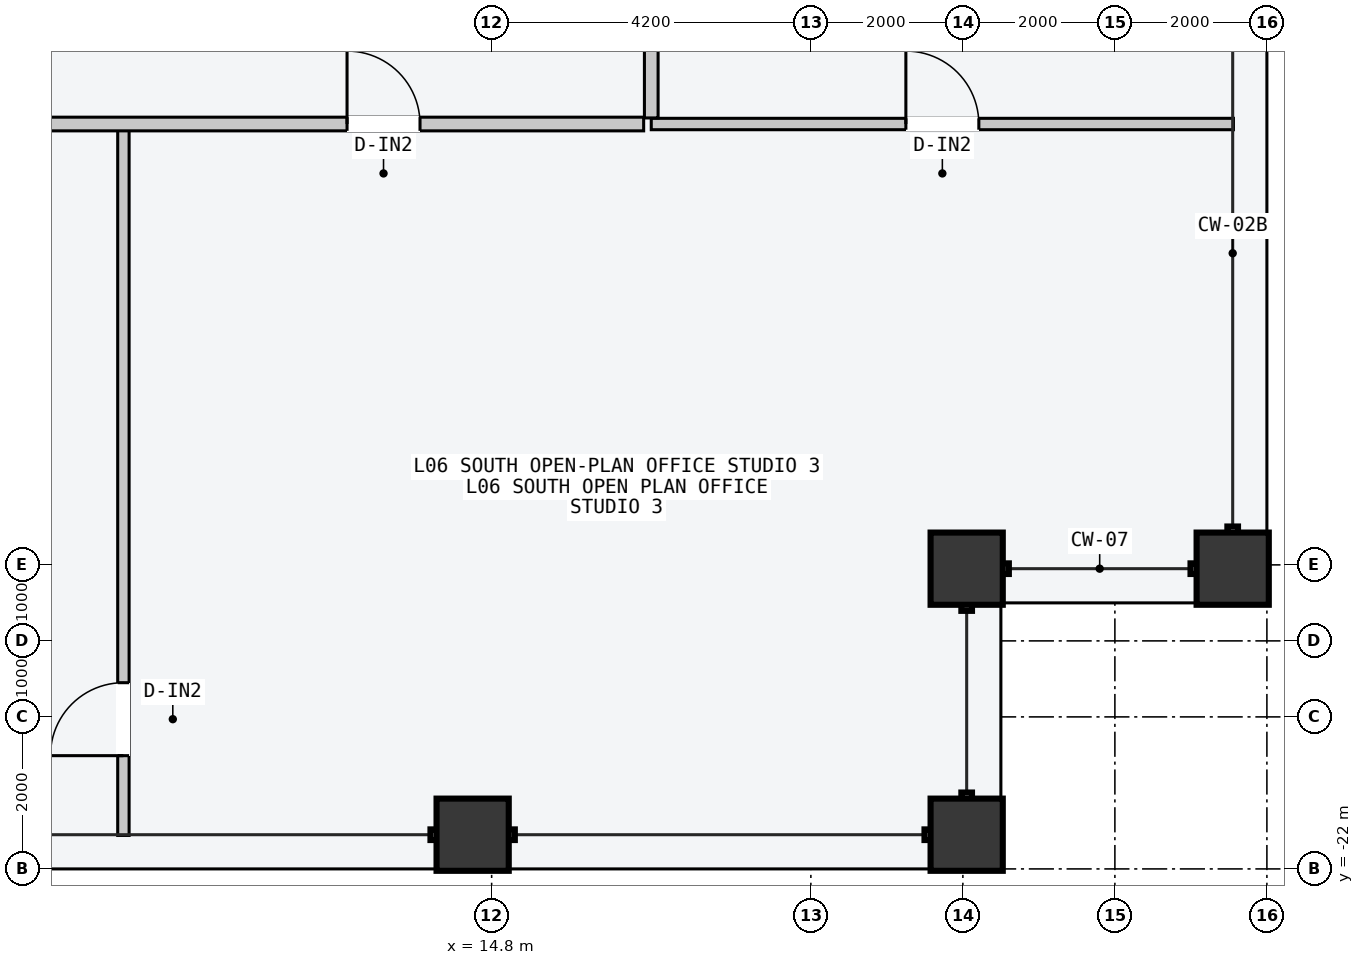
"""IFC4 building model, lengths in metres.
Left out: names, types, materials, properties, quantities, classifications, styles, units other than length and angle.
Written with IfcOpenShell. Run it as: python <this file> out.ifc"""

import sys

from ifc_helpers import new_model, si_unit, direction, frame, frame_2d, origin, origin_2d, place, context, subcontext, project, spatial, rectangle, hollow_rectangle, extrude, element, fill, save


model = new_model("IFC4")
c1 = context("Model", 3, precision=1e-05, world=origin(), true_north=direction((0.0, 1.0)))
c2 = subcontext(c1, "Body", "Model", "MODEL_VIEW")
j1 = project(units=[si_unit("LENGTHUNIT", "METRE"), si_unit("PLANEANGLEUNIT", "RADIAN")], contexts=[c1])
p1 = place(None, origin())
s1 = spatial("IfcSite", under=j1, at=p1, CompositionType="ELEMENT")
p2 = place(p1, origin())
s2 = spatial("IfcBuilding", under=s1, at=p2, CompositionType="ELEMENT")
p3 = place(p2, frame((0.0, 0.0, 27.6)))
s3 = spatial("IfcBuildingStorey", under=s2, at=p3, CompositionType="ELEMENT", Elevation=27.6)
for number, where, z_axis, x_axis in (
    (1, (14.55, -21.55, 0.0), (0.0, 0.0, 1.0), (1.0, 0.0, 0.0)),
    (2, (21.05, -21.55, 0.0), (0.0, 0.0, 1.0), (1.0, 0.0, 0.0)),
    (3, (24.55, -18.05, 0.0), (0.0, 0.0, 1.0), (0.0, 1.0, 0.0)),
    (4, (21.05, -18.05, 0.0), (0.0, 0.0, 1.0), (1.0, 0.0, 0.0)),
):
    element("IfcColumn", number, at=place(p3, frame(where, z_axis=z_axis, x_axis=x_axis)), inside=s3, PredefinedType="COLUMN", context=c2, shape_type="SweptSolid", body=[
        extrude(hollow_rectangle(XDim=0.95, YDim=0.95, WallThickness=0.048, at=origin_2d()), origin(), (0.0, 0.0, 1.0), 3.6),
    ])
p4 = place(p3, frame((9.955, -21.56, 0.0), z_axis=(0.0, 0.0, 1.0), x_axis=(0.0, 1.0, 0.0)))
e5 = element("IfcWall", 5, at=p4, inside=s3, PredefinedType="PARTITIONING", context=c2, shape_type="SweptSolid", body=[
    extrude(rectangle(XDim=9.3, YDim=0.15, at=frame_2d((4.65, 0.0))), origin(), (0.0, 0.0, 1.0), 3.4),
])
p5 = place(p4, frame((1.05, 0.0, 0.0)))
e6 = element("IfcOpeningElement", 6, at=p5, cuts=e5, PredefinedType="OPENING", context=c2, shape_type="SweptSolid", body=[
    extrude(rectangle(XDim=0.96, YDim=2.18, at=frame_2d((0.48, 1.09))), frame((0.0, 0.085, 0.0), z_axis=(0.0, -1.0, 0.0), x_axis=(1.0, 0.0, 0.0)), (0.0, 0.0, 1.0), 0.17),
])
p6 = place(p3, frame((-16.8, -12.2, 0.0), z_axis=(0.0, 0.0, 1.0), x_axis=(1.0, 0.0, 0.0)))
e7 = element("IfcWall", 7, at=p6, inside=s3, PredefinedType="PARTITIONING", context=c2, shape_type="SweptSolid", body=[
    extrude(rectangle(XDim=33.6, YDim=0.18, at=frame_2d((16.8, 0.0))), origin(), (0.0, 0.0, 1.0), 3.4),
])
p7 = place(p6, frame((6.505, 0.0, 0.0)))
e8 = element("IfcOpeningElement", 8, at=p7, cuts=e7, PredefinedType="OPENING", context=c2, shape_type="SweptSolid", body=[
    extrude(rectangle(XDim=1.4, YDim=2.2, at=frame_2d((0.7, 1.1))), frame((0.0, 0.1, 0.0), z_axis=(0.0, -1.0, 0.0), x_axis=(1.0, 0.0, 0.0)), (0.0, 0.0, 1.0), 0.2),
])
p8 = place(p6, frame((20.133, 0.0, 0.0)))
e9 = element("IfcOpeningElement", 9, at=p8, cuts=e7, PredefinedType="OPENING", context=c2, shape_type="SweptSolid", body=[
    extrude(rectangle(XDim=0.9, YDim=2.15, at=frame_2d((0.45, 1.075))), frame((0.0, 0.1, 0.0), z_axis=(0.0, -1.0, 0.0), x_axis=(1.0, 0.0, 0.0)), (0.0, 0.0, 1.0), 0.2),
])
p9 = place(p6, frame((29.698, 0.0, 0.0)))
e10 = element("IfcOpeningElement", 10, at=p9, cuts=e7, PredefinedType="OPENING", context=c2, shape_type="SweptSolid", body=[
    extrude(rectangle(XDim=0.96, YDim=2.18, at=frame_2d((0.48, 1.09))), frame((0.0, 0.1, 0.0), z_axis=(0.0, -1.0, 0.0), x_axis=(1.0, 0.0, 0.0)), (0.0, 0.0, 1.0), 0.2),
])
p10 = place(p3, frame((16.9, -12.2, 0.0), z_axis=(0.0, 0.0, 1.0), x_axis=(1.0, 0.0, 0.0)))
e11 = element("IfcWall", 11, at=p10, inside=s3, PredefinedType="PARTITIONING", context=c2, shape_type="SweptSolid", body=[
    extrude(rectangle(XDim=7.66, YDim=0.15, at=frame_2d((3.83, 0.0))), origin(), (0.0, 0.0, 1.0), 3.4),
])
p11 = place(p10, frame((3.35, 0.0, 0.0)))
e12 = element("IfcOpeningElement", 12, at=p11, cuts=e11, PredefinedType="OPENING", context=c2, shape_type="SweptSolid", body=[
    extrude(rectangle(XDim=0.96, YDim=2.18, at=frame_2d((0.48, 1.09))), frame((0.0, 0.085, 0.0), z_axis=(0.0, -1.0, 0.0), x_axis=(1.0, 0.0, 0.0)), (0.0, 0.0, 1.0), 0.17),
])
p12 = place(p3, frame((16.9, -12.12, 0.0), z_axis=(0.0, 0.0, 1.0), x_axis=(0.0, 1.0, 0.0)))
e13 = element("IfcWall", 13, at=p12, inside=s3, PredefinedType="PARTITIONING", context=c2, shape_type="SweptSolid", body=[
    extrude(rectangle(XDim=24.24, YDim=0.18, at=frame_2d((12.12, 0.0))), origin(), (0.0, 0.0, 1.0), 3.4),
])
p13 = place(p12, frame((3.591, 0.0, 0.0)))
e14 = element("IfcOpeningElement", 14, at=p13, cuts=e13, PredefinedType="OPENING", context=c2, shape_type="SweptSolid", body=[
    extrude(rectangle(XDim=1.06, YDim=2.2, at=frame_2d((0.53, 1.1))), frame((0.0, 0.1, 0.0), z_axis=(0.0, -1.0, 0.0), x_axis=(1.0, 0.0, 0.0)), (0.0, 0.0, 1.0), 0.2),
])
p14 = place(p12, frame((15.621, 0.0, 0.0)))
e15 = element("IfcOpeningElement", 15, at=p14, cuts=e13, PredefinedType="OPENING", context=c2, shape_type="SweptSolid", body=[
    extrude(rectangle(XDim=1.24, YDim=2.24, at=frame_2d((0.62, 1.12))), frame((0.0, 0.1, 0.0), z_axis=(0.0, -1.0, 0.0), x_axis=(1.0, 0.0, 0.0)), (0.0, 0.0, 1.0), 0.2),
])
p15 = place(p5, origin())
e16 = element("IfcDoor", 16, at=p15, inside=s3, OperationType="SINGLE_SWING_LEFT", PredefinedType="DOOR", context=c2, shape_type="SweptSolid", body=[
    extrude(rectangle(XDim=0.96, YDim=2.18, at=frame_2d((0.48, 1.09))), frame((0.0, 0.025, 0.0), z_axis=(0.0, -1.0, 0.0), x_axis=(1.0, 0.0, 0.0)), (0.0, 0.0, 1.0), 0.05),
])
fill(e6, e16)
p16 = place(p9, origin())
e17 = element("IfcDoor", 17, at=p16, inside=s3, OperationType="SINGLE_SWING_LEFT", PredefinedType="DOOR", context=c2, shape_type="SweptSolid", body=[
    extrude(rectangle(XDim=0.96, YDim=2.18, at=frame_2d((0.48, 1.09))), frame((0.0, 0.025, 0.0), z_axis=(0.0, -1.0, 0.0), x_axis=(1.0, 0.0, 0.0)), (0.0, 0.0, 1.0), 0.05),
])
fill(e10, e17)
p17 = place(p11, origin())
e18 = element("IfcDoor", 18, at=p17, inside=s3, OperationType="SINGLE_SWING_LEFT", PredefinedType="DOOR", context=c2, shape_type="SweptSolid", body=[
    extrude(rectangle(XDim=0.96, YDim=2.18, at=frame_2d((0.48, 1.09))), frame((0.0, 0.025, 0.0), z_axis=(0.0, -1.0, 0.0), x_axis=(1.0, 0.0, 0.0)), (0.0, 0.0, 1.0), 0.05),
])
fill(e12, e18)
save(model, sys.argv[1])
